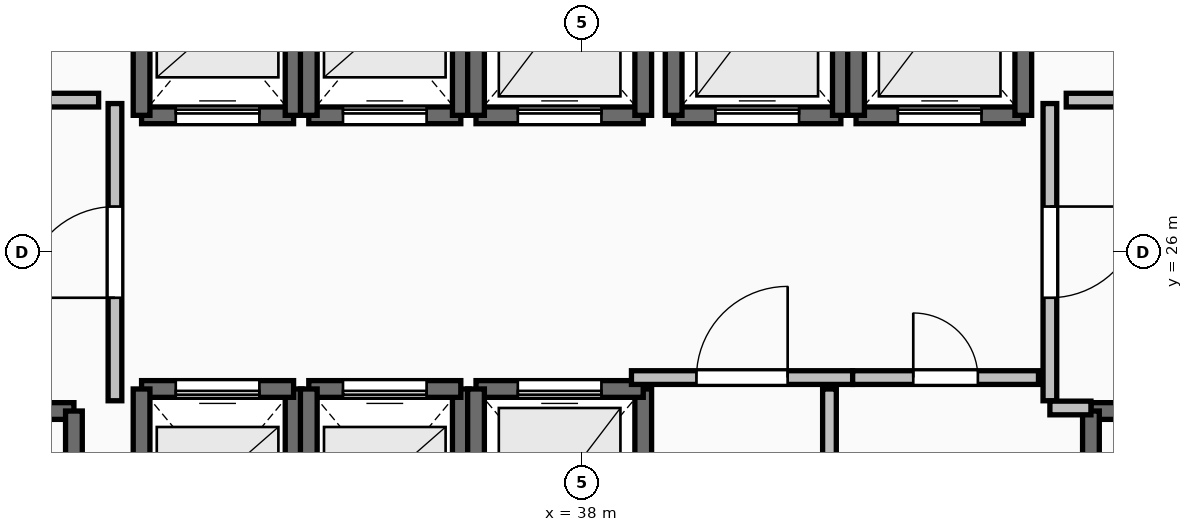
"""IFC4 building model, lengths in metres.
Left out: names, types, materials, properties, quantities, classifications, styles, units other than length and angle.
Written with IfcOpenShell. Run it as: python <this file> out.ifc"""

import sys

from ifc_helpers import new_model, si_unit, direction, frame, frame_2d, origin, place, context, subcontext, project, spatial, rectangle, extrude, element, fill, save


model = new_model("IFC4")
c1 = context("Model", 3, precision=1e-05, world=origin(), true_north=direction((0.0, 1.0)))
c2 = subcontext(c1, "Body", "Model", "MODEL_VIEW")
j1 = project(units=[si_unit("LENGTHUNIT", "METRE"), si_unit("PLANEANGLEUNIT", "RADIAN")], contexts=[c1])
p1 = place(None, origin())
s1 = spatial("IfcSite", under=j1, at=p1, CompositionType="ELEMENT")
p2 = place(p1, origin())
s2 = spatial("IfcBuilding", under=s1, at=p2, CompositionType="ELEMENT")
p3 = place(p2, origin())
s3 = spatial("IfcBuildingStorey", under=s2, at=p3, CompositionType="ELEMENT", Elevation=0.0)
p4 = place(p3, frame((27.94, 23.91, 0.0), z_axis=(0.0, 0.0, 1.0), x_axis=(1.0, 0.0, 0.0)))
e1 = element("IfcWall", 1, at=p4, inside=s3, PredefinedType="SOLIDWALL", context=c2, shape_type="SweptSolid", body=[
    extrude(rectangle(XDim=3.37, YDim=0.22, at=frame_2d((1.685, 0.0))), origin(), (0.0, 0.0, 1.0), 4.48),
])
p5 = place(p4, frame((1.135, 0.0, 0.0)))
e2 = element("IfcOpeningElement", 2, at=p5, cuts=e1, PredefinedType="OPENING", context=c2, shape_type="SweptSolid", body=[
    extrude(rectangle(XDim=1.1, YDim=2.15, at=frame_2d((0.55, 1.075))), frame((0.0, 0.125, 0.0), z_axis=(0.0, -1.0, 0.0), x_axis=(1.0, 0.0, 0.0)), (0.0, 0.0, 1.0), 0.25),
])
p6 = place(p3, frame((31.31, 23.91, 0.0), z_axis=(0.0, 0.0, 1.0), x_axis=(0.0, -1.0, 0.0)))
e3 = element("IfcWall", 3, at=p6, inside=s3, PredefinedType="SOLIDWALL", context=c2, shape_type="SweptSolid", body=[
    extrude(rectangle(XDim=7.42, YDim=0.22, at=frame_2d((3.71, 0.0))), origin(), (0.0, 0.0, 1.0), 4.48),
])
p7 = place(p3, frame((44.69, 23.91, 0.0), z_axis=(0.0, 0.0, 1.0), x_axis=(1.0, 0.0, 0.0)))
e4 = element("IfcWall", 4, at=p7, inside=s3, PredefinedType="SOLIDWALL", context=c2, shape_type="SweptSolid", body=[
    extrude(rectangle(XDim=3.37, YDim=0.22, at=frame_2d((1.685, 0.0))), origin(), (0.0, 0.0, 1.0), 4.48),
])
p8 = place(p7, frame((1.135, 0.0, 0.0)))
e5 = element("IfcOpeningElement", 5, at=p8, cuts=e4, PredefinedType="OPENING", context=c2, shape_type="SweptSolid", body=[
    extrude(rectangle(XDim=1.1, YDim=2.15, at=frame_2d((0.55, 1.075))), frame((0.0, 0.125, 0.0), z_axis=(0.0, -1.0, 0.0), x_axis=(1.0, 0.0, 0.0)), (0.0, 0.0, 1.0), 0.25),
])
p9 = place(p3, frame((44.69, 16.49, 0.0), z_axis=(0.0, 0.0, 1.0), x_axis=(0.0, 1.0, 0.0)))
e6 = element("IfcWall", 6, at=p9, inside=s3, PredefinedType="SOLIDWALL", context=c2, shape_type="SweptSolid", body=[
    extrude(rectangle(XDim=7.42, YDim=0.22, at=frame_2d((3.71, 0.0))), origin(), (0.0, 0.0, 1.0), 4.48),
])
p10 = place(p3, frame((32.2, 27.8, 0.0), z_axis=(0.0, 0.0, 1.0), x_axis=(1.0, 0.0, 0.0)))
e7 = element("IfcWall", 7, at=p10, inside=s3, PredefinedType="SOLIDWALL", context=c2, shape_type="SweptSolid", body=[
    extrude(rectangle(XDim=2.0, YDim=0.22, at=frame_2d((1.0, 0.0))), origin(), (0.0, 0.0, 1.0), 4.48),
])
p11 = place(p10, frame((0.45, 0.0, 0.0)))
e8 = element("IfcOpeningElement", 8, at=p11, cuts=e7, PredefinedType="OPENING", context=c2, shape_type="SweptSolid", body=[
    extrude(rectangle(XDim=1.1, YDim=2.2, at=frame_2d((0.55, 1.1))), frame((0.0, 0.125, 0.0), z_axis=(0.0, -1.0, 0.0), x_axis=(1.0, 0.0, 0.0)), (0.0, 0.0, 1.0), 0.25),
])
for number, where, z_axis, x_axis in (
    (9, (34.2, 27.8, 0.0), (0.0, 0.0, 1.0), (0.0, 1.0, 0.0)),
    (10, (32.2, 30.2, 0.0), (0.0, 0.0, 1.0), (0.0, -1.0, 0.0)),
):
    element("IfcWall", number, at=place(p3, frame(where, z_axis=z_axis, x_axis=x_axis)), inside=s3, PredefinedType="SOLIDWALL", context=c2, shape_type="SweptSolid", body=[
        extrude(rectangle(XDim=2.4, YDim=0.22, at=frame_2d((1.2, 0.0))), origin(), (0.0, 0.0, 1.0), 4.48),
    ])
p12 = place(p3, frame((34.4, 27.8, 0.0), z_axis=(0.0, 0.0, 1.0), x_axis=(1.0, 0.0, 0.0)))
e11 = element("IfcWall", 11, at=p12, inside=s3, PredefinedType="SOLIDWALL", context=c2, shape_type="SweptSolid", body=[
    extrude(rectangle(XDim=2.0, YDim=0.22, at=frame_2d((1.0, 0.0))), origin(), (0.0, 0.0, 1.0), 4.48),
])
p13 = place(p12, frame((0.45, 0.0, 0.0)))
e12 = element("IfcOpeningElement", 12, at=p13, cuts=e11, PredefinedType="OPENING", context=c2, shape_type="SweptSolid", body=[
    extrude(rectangle(XDim=1.1, YDim=2.2, at=frame_2d((0.55, 1.1))), frame((0.0, 0.125, 0.0), z_axis=(0.0, -1.0, 0.0), x_axis=(1.0, 0.0, 0.0)), (0.0, 0.0, 1.0), 0.25),
])
for number, where, z_axis, x_axis in (
    (13, (36.4, 27.8, 0.0), (0.0, 0.0, 1.0), (0.0, 1.0, 0.0)),
    (14, (34.4, 30.2, 0.0), (0.0, 0.0, 1.0), (0.0, -1.0, 0.0)),
):
    element("IfcWall", number, at=place(p3, frame(where, z_axis=z_axis, x_axis=x_axis)), inside=s3, PredefinedType="SOLIDWALL", context=c2, shape_type="SweptSolid", body=[
        extrude(rectangle(XDim=2.4, YDim=0.22, at=frame_2d((1.2, 0.0))), origin(), (0.0, 0.0, 1.0), 4.48),
    ])
p14 = place(p3, frame((36.6, 27.8, 0.0), z_axis=(0.0, 0.0, 1.0), x_axis=(1.0, 0.0, 0.0)))
e15 = element("IfcWall", 15, at=p14, inside=s3, PredefinedType="SOLIDWALL", context=c2, shape_type="SweptSolid", body=[
    extrude(rectangle(XDim=2.2, YDim=0.22, at=frame_2d((1.1, 0.0))), origin(), (0.0, 0.0, 1.0), 4.48),
])
p15 = place(p14, frame((0.55, 0.0, 0.0)))
e16 = element("IfcOpeningElement", 16, at=p15, cuts=e15, PredefinedType="OPENING", context=c2, shape_type="SweptSolid", body=[
    extrude(rectangle(XDim=1.1, YDim=2.2, at=frame_2d((0.55, 1.1))), frame((0.0, 0.125, 0.0), z_axis=(0.0, -1.0, 0.0), x_axis=(1.0, 0.0, 0.0)), (0.0, 0.0, 1.0), 0.25),
])
for number, where, z_axis, x_axis in (
    (17, (38.8, 27.8, 0.0), (0.0, 0.0, 1.0), (0.0, 1.0, 0.0)),
    (18, (36.6, 30.4, 0.0), (0.0, 0.0, 1.0), (0.0, -1.0, 0.0)),
):
    element("IfcWall", number, at=place(p3, frame(where, z_axis=z_axis, x_axis=x_axis)), inside=s3, PredefinedType="SOLIDWALL", context=c2, shape_type="SweptSolid", body=[
        extrude(rectangle(XDim=2.6, YDim=0.22, at=frame_2d((1.3, 0.0))), origin(), (0.0, 0.0, 1.0), 4.48),
    ])
p16 = place(p3, frame((34.2, 21.8, 0.0), z_axis=(0.0, 0.0, 1.0), x_axis=(0.0, 1.0, 0.0)))
e19 = element("IfcWall", 19, at=p16, inside=s3, PredefinedType="SOLIDWALL", context=c2, shape_type="SweptSolid", body=[
    extrude(rectangle(XDim=2.4, YDim=0.22, at=frame_2d((1.2, 0.0))), origin(), (0.0, 0.0, 1.0), 4.48),
])
p17 = place(p3, frame((34.2, 24.2, 0.0), z_axis=(0.0, 0.0, 1.0), x_axis=(-1.0, 0.0, 0.0)))
e20 = element("IfcWall", 20, at=p17, inside=s3, PredefinedType="SOLIDWALL", context=c2, shape_type="SweptSolid", body=[
    extrude(rectangle(XDim=2.0, YDim=0.22, at=frame_2d((1.0, 0.0))), origin(), (0.0, 0.0, 1.0), 4.48),
])
p18 = place(p17, frame((0.45, 0.0, 0.0)))
e21 = element("IfcOpeningElement", 21, at=p18, cuts=e20, PredefinedType="OPENING", context=c2, shape_type="SweptSolid", body=[
    extrude(rectangle(XDim=1.1, YDim=2.2, at=frame_2d((0.55, 1.1))), frame((0.0, 0.125, 0.0), z_axis=(0.0, -1.0, 0.0), x_axis=(1.0, 0.0, 0.0)), (0.0, 0.0, 1.0), 0.25),
])
for number, where, z_axis, x_axis in (
    (22, (32.2, 24.2, 0.0), (0.0, 0.0, 1.0), (0.0, -1.0, 0.0)),
    (23, (36.4, 21.8, 0.0), (0.0, 0.0, 1.0), (0.0, 1.0, 0.0)),
):
    element("IfcWall", number, at=place(p3, frame(where, z_axis=z_axis, x_axis=x_axis)), inside=s3, PredefinedType="SOLIDWALL", context=c2, shape_type="SweptSolid", body=[
        extrude(rectangle(XDim=2.4, YDim=0.22, at=frame_2d((1.2, 0.0))), origin(), (0.0, 0.0, 1.0), 4.48),
    ])
p19 = place(p3, frame((36.4, 24.2, 0.0), z_axis=(0.0, 0.0, 1.0), x_axis=(-1.0, 0.0, 0.0)))
e24 = element("IfcWall", 24, at=p19, inside=s3, PredefinedType="SOLIDWALL", context=c2, shape_type="SweptSolid", body=[
    extrude(rectangle(XDim=2.0, YDim=0.22, at=frame_2d((1.0, 0.0))), origin(), (0.0, 0.0, 1.0), 4.48),
])
p20 = place(p19, frame((0.45, 0.0, 0.0)))
e25 = element("IfcOpeningElement", 25, at=p20, cuts=e24, PredefinedType="OPENING", context=c2, shape_type="SweptSolid", body=[
    extrude(rectangle(XDim=1.1, YDim=2.2, at=frame_2d((0.55, 1.1))), frame((0.0, 0.125, 0.0), z_axis=(0.0, -1.0, 0.0), x_axis=(1.0, 0.0, 0.0)), (0.0, 0.0, 1.0), 0.25),
])
p21 = place(p3, frame((34.4, 24.2, 0.0), z_axis=(0.0, 0.0, 1.0), x_axis=(0.0, -1.0, 0.0)))
e26 = element("IfcWall", 26, at=p21, inside=s3, PredefinedType="SOLIDWALL", context=c2, shape_type="SweptSolid", body=[
    extrude(rectangle(XDim=2.4, YDim=0.22, at=frame_2d((1.2, 0.0))), origin(), (0.0, 0.0, 1.0), 4.48),
])
p22 = place(p3, frame((38.8, 21.6, 0.0), z_axis=(0.0, 0.0, 1.0), x_axis=(0.0, 1.0, 0.0)))
e27 = element("IfcWall", 27, at=p22, inside=s3, PredefinedType="SOLIDWALL", context=c2, shape_type="SweptSolid", body=[
    extrude(rectangle(XDim=2.6, YDim=0.22, at=frame_2d((1.3, 0.0))), origin(), (0.0, 0.0, 1.0), 4.48),
])
p23 = place(p3, frame((38.8, 24.2, 0.0), z_axis=(0.0, 0.0, 1.0), x_axis=(-1.0, 0.0, 0.0)))
e28 = element("IfcWall", 28, at=p23, inside=s3, PredefinedType="SOLIDWALL", context=c2, shape_type="SweptSolid", body=[
    extrude(rectangle(XDim=2.2, YDim=0.22, at=frame_2d((1.1, 0.0))), origin(), (0.0, 0.0, 1.0), 4.48),
])
p24 = place(p23, frame((0.55, 0.0, 0.0)))
e29 = element("IfcOpeningElement", 29, at=p24, cuts=e28, PredefinedType="OPENING", context=c2, shape_type="SweptSolid", body=[
    extrude(rectangle(XDim=1.1, YDim=2.2, at=frame_2d((0.55, 1.1))), frame((0.0, 0.125, 0.0), z_axis=(0.0, -1.0, 0.0), x_axis=(1.0, 0.0, 0.0)), (0.0, 0.0, 1.0), 0.25),
])
p25 = place(p3, frame((36.6, 24.2, 0.0), z_axis=(0.0, 0.0, 1.0), x_axis=(0.0, -1.0, 0.0)))
e30 = element("IfcWall", 30, at=p25, inside=s3, PredefinedType="SOLIDWALL", context=c2, shape_type="SweptSolid", body=[
    extrude(rectangle(XDim=2.6, YDim=0.22, at=frame_2d((1.3, 0.0))), origin(), (0.0, 0.0, 1.0), 4.48),
])
p26 = place(p3, frame((39.2, 27.8, 0.0), z_axis=(0.0, 0.0, 1.0), x_axis=(1.0, 0.0, 0.0)))
e31 = element("IfcWall", 31, at=p26, inside=s3, PredefinedType="SOLIDWALL", context=c2, shape_type="SweptSolid", body=[
    extrude(rectangle(XDim=2.2, YDim=0.22, at=frame_2d((1.1, 0.0))), origin(), (0.0, 0.0, 1.0), 4.48),
])
p27 = place(p26, frame((0.55, 0.0, 0.0)))
e32 = element("IfcOpeningElement", 32, at=p27, cuts=e31, PredefinedType="OPENING", context=c2, shape_type="SweptSolid", body=[
    extrude(rectangle(XDim=1.1, YDim=2.2, at=frame_2d((0.55, 1.1))), frame((0.0, 0.125, 0.0), z_axis=(0.0, -1.0, 0.0), x_axis=(1.0, 0.0, 0.0)), (0.0, 0.0, 1.0), 0.25),
])
for number, where, z_axis, x_axis in (
    (33, (41.4, 27.8, 0.0), (0.0, 0.0, 1.0), (0.0, 1.0, 0.0)),
    (34, (39.2, 30.4, 0.0), (0.0, 0.0, 1.0), (0.0, -1.0, 0.0)),
):
    element("IfcWall", number, at=place(p3, frame(where, z_axis=z_axis, x_axis=x_axis)), inside=s3, PredefinedType="SOLIDWALL", context=c2, shape_type="SweptSolid", body=[
        extrude(rectangle(XDim=2.6, YDim=0.22, at=frame_2d((1.3, 0.0))), origin(), (0.0, 0.0, 1.0), 4.48),
    ])
p28 = place(p3, frame((41.6, 27.8, 0.0), z_axis=(0.0, 0.0, 1.0), x_axis=(1.0, 0.0, 0.0)))
e35 = element("IfcWall", 35, at=p28, inside=s3, PredefinedType="SOLIDWALL", context=c2, shape_type="SweptSolid", body=[
    extrude(rectangle(XDim=2.2, YDim=0.22, at=frame_2d((1.1, 0.0))), origin(), (0.0, 0.0, 1.0), 4.48),
])
p29 = place(p28, frame((0.55, 0.0, 0.0)))
e36 = element("IfcOpeningElement", 36, at=p29, cuts=e35, PredefinedType="OPENING", context=c2, shape_type="SweptSolid", body=[
    extrude(rectangle(XDim=1.1, YDim=2.2, at=frame_2d((0.55, 1.1))), frame((0.0, 0.125, 0.0), z_axis=(0.0, -1.0, 0.0), x_axis=(1.0, 0.0, 0.0)), (0.0, 0.0, 1.0), 0.25),
])
for number, where, z_axis, x_axis in (
    (37, (43.8, 27.8, 0.0), (0.0, 0.0, 1.0), (0.0, 1.0, 0.0)),
    (38, (41.6, 30.4, 0.0), (0.0, 0.0, 1.0), (0.0, -1.0, 0.0)),
):
    element("IfcWall", number, at=place(p3, frame(where, z_axis=z_axis, x_axis=x_axis)), inside=s3, PredefinedType="SOLIDWALL", context=c2, shape_type="SweptSolid", body=[
        extrude(rectangle(XDim=2.6, YDim=0.22, at=frame_2d((1.3, 0.0))), origin(), (0.0, 0.0, 1.0), 4.48),
    ])
p30 = place(p3, frame((31.85, 24.045, 0.0), z_axis=(0.0, 0.0, 1.0), x_axis=(0.0, 1.0, 0.0)))
e39 = element("IfcWall", 39, at=p30, inside=s3, PredefinedType="PARTITIONING", context=c2, shape_type="SweptSolid", body=[
    extrude(rectangle(XDim=3.91, YDim=0.18, at=frame_2d((1.955, 0.0))), origin(), (0.0, 0.0, 1.0), 4.48),
])
p31 = place(p30, frame((1.355, 0.0, 0.0)))
e40 = element("IfcOpeningElement", 40, at=p31, cuts=e39, PredefinedType="OPENING", context=c2, shape_type="SweptSolid", body=[
    extrude(rectangle(XDim=1.2, YDim=2.15, at=frame_2d((0.6, 1.075))), frame((0.0, 0.105, 0.0), z_axis=(0.0, -1.0, 0.0), x_axis=(1.0, 0.0, 0.0)), (0.0, 0.0, 1.0), 0.21),
])
p32 = place(p3, frame((44.15, 27.955, 0.0), z_axis=(0.0, 0.0, 1.0), x_axis=(0.0, -1.0, 0.0)))
e41 = element("IfcWall", 41, at=p32, inside=s3, PredefinedType="PARTITIONING", context=c2, shape_type="SweptSolid", body=[
    extrude(rectangle(XDim=3.91, YDim=0.18, at=frame_2d((1.955, 0.0))), origin(), (0.0, 0.0, 1.0), 4.48),
])
p33 = place(p32, frame((1.355, 0.0, 0.0)))
e42 = element("IfcOpeningElement", 42, at=p33, cuts=e41, PredefinedType="OPENING", context=c2, shape_type="SweptSolid", body=[
    extrude(rectangle(XDim=1.2, YDim=2.15, at=frame_2d((0.6, 1.075))), frame((0.0, 0.105, 0.0), z_axis=(0.0, -1.0, 0.0), x_axis=(1.0, 0.0, 0.0)), (0.0, 0.0, 1.0), 0.21),
])
p34 = place(p3, frame((44.15, 23.95, 0.0), z_axis=(0.0, 0.0, 1.0), x_axis=(1.0, 0.0, 0.0)))
e43 = element("IfcWall", 43, at=p34, inside=s3, PredefinedType="PARTITIONING", context=c2, shape_type="SweptSolid", body=[
    extrude(rectangle(XDim=0.54, YDim=0.18, at=frame_2d((0.27, 0.0))), origin(), (0.0, 0.0, 1.0), 4.48),
])
p35 = place(p3, frame((38.645, 24.35, 0.0), z_axis=(0.0, 0.0, 1.0), x_axis=(1.0, 0.0, 0.0)))
e44 = element("IfcWall", 44, at=p35, inside=s3, PredefinedType="PARTITIONING", context=c2, shape_type="SweptSolid", body=[
    extrude(rectangle(XDim=2.91, YDim=0.18, at=frame_2d((1.455, 0.0))), origin(), (0.0, 0.0, 1.0), 4.48),
])
p36 = place(p35, frame((0.855, 0.0, 0.0)))
e45 = element("IfcOpeningElement", 45, at=p36, cuts=e44, PredefinedType="OPENING", context=c2, shape_type="SweptSolid", body=[
    extrude(rectangle(XDim=1.2, YDim=2.15, at=frame_2d((0.6, 1.075))), frame((0.0, 0.105, 0.0), z_axis=(0.0, -1.0, 0.0), x_axis=(1.0, 0.0, 0.0)), (0.0, 0.0, 1.0), 0.21),
])
p37 = place(p3, frame((41.555, 24.35, 0.0), z_axis=(0.0, 0.0, 1.0), x_axis=(1.0, 0.0, 0.0)))
e46 = element("IfcWall", 46, at=p37, inside=s3, PredefinedType="PARTITIONING", context=c2, shape_type="SweptSolid", body=[
    extrude(rectangle(XDim=2.445, YDim=0.18, at=frame_2d((1.223, 0.0))), origin(), (0.0, 0.0, 1.0), 4.48),
])
p38 = place(p37, frame((0.798, 0.0, 0.0)))
e47 = element("IfcOpeningElement", 47, at=p38, cuts=e46, PredefinedType="OPENING", context=c2, shape_type="SweptSolid", body=[
    extrude(rectangle(XDim=0.85, YDim=2.1, at=frame_2d((0.425, 1.05))), frame((0.0, 0.105, 0.0), z_axis=(0.0, -1.0, 0.0), x_axis=(1.0, 0.0, 0.0)), (0.0, 0.0, 1.0), 0.21),
])
p39 = place(p3, frame((41.25, 20.305, 0.0), z_axis=(0.0, 0.0, 1.0), x_axis=(0.0, 1.0, 0.0)))
e48 = element("IfcWall", 48, at=p39, inside=s3, PredefinedType="PARTITIONING", context=c2, shape_type="SweptSolid", body=[
    extrude(rectangle(XDim=3.895, YDim=0.18, at=frame_2d((1.948, 0.0))), origin(), (0.0, 0.0, 1.0), 4.48),
])
p40 = place(p39, frame((1.522, 0.0, 0.0)))
e49 = element("IfcOpeningElement", 49, at=p40, cuts=e48, PredefinedType="OPENING", context=c2, shape_type="SweptSolid", body=[
    extrude(rectangle(XDim=0.85, YDim=2.1, at=frame_2d((0.425, 1.05))), frame((0.0, 0.105, 0.0), z_axis=(0.0, -1.0, 0.0), x_axis=(1.0, 0.0, 0.0)), (0.0, 0.0, 1.0), 0.21),
])
for number, where, z_axis, x_axis in (
    (50, (31.635, 28.0, 0.0), (0.0, 0.0, 1.0), (-1.0, 0.0, 0.0)),
    (51, (45.28, 28.0, 0.0), (0.0, 0.0, 1.0), (-1.0, 0.0, 0.0)),
):
    element("IfcWall", number, at=place(p3, frame(where, z_axis=z_axis, x_axis=x_axis)), inside=s3, PredefinedType="PARTITIONING", context=c2, shape_type="SweptSolid", body=[
        extrude(rectangle(XDim=0.915, YDim=0.18, at=frame_2d((0.458, 0.0))), origin(), (0.0, 0.0, 1.0), 4.48),
    ])
p41 = place(p11, origin())
e52 = element("IfcDoor", 52, at=p41, inside=s3, OperationType="SLIDING_TO_LEFT", PredefinedType="DOOR", context=c2, shape_type="SweptSolid", body=[
    extrude(rectangle(XDim=1.1, YDim=2.2, at=frame_2d((0.55, 1.1))), frame((0.0, 0.025, 0.0), z_axis=(0.0, -1.0, 0.0), x_axis=(1.0, 0.0, 0.0)), (0.0, 0.0, 1.0), 0.05),
])
fill(e8, e52)
p42 = place(p13, origin())
e53 = element("IfcDoor", 53, at=p42, inside=s3, OperationType="SLIDING_TO_LEFT", PredefinedType="DOOR", context=c2, shape_type="SweptSolid", body=[
    extrude(rectangle(XDim=1.1, YDim=2.2, at=frame_2d((0.55, 1.1))), frame((0.0, 0.025, 0.0), z_axis=(0.0, -1.0, 0.0), x_axis=(1.0, 0.0, 0.0)), (0.0, 0.0, 1.0), 0.05),
])
fill(e12, e53)
p43 = place(p15, origin())
e54 = element("IfcDoor", 54, at=p43, inside=s3, OperationType="SLIDING_TO_LEFT", PredefinedType="DOOR", context=c2, shape_type="SweptSolid", body=[
    extrude(rectangle(XDim=1.1, YDim=2.2, at=frame_2d((0.55, 1.1))), frame((0.0, 0.025, 0.0), z_axis=(0.0, -1.0, 0.0), x_axis=(1.0, 0.0, 0.0)), (0.0, 0.0, 1.0), 0.05),
])
fill(e16, e54)
p44 = place(p18, origin())
e55 = element("IfcDoor", 55, at=p44, inside=s3, OperationType="SLIDING_TO_LEFT", PredefinedType="DOOR", context=c2, shape_type="SweptSolid", body=[
    extrude(rectangle(XDim=1.1, YDim=2.2, at=frame_2d((0.55, 1.1))), frame((0.0, 0.025, 0.0), z_axis=(0.0, -1.0, 0.0), x_axis=(1.0, 0.0, 0.0)), (0.0, 0.0, 1.0), 0.05),
])
fill(e21, e55)
p45 = place(p20, origin())
e56 = element("IfcDoor", 56, at=p45, inside=s3, OperationType="SLIDING_TO_LEFT", PredefinedType="DOOR", context=c2, shape_type="SweptSolid", body=[
    extrude(rectangle(XDim=1.1, YDim=2.2, at=frame_2d((0.55, 1.1))), frame((0.0, 0.025, 0.0), z_axis=(0.0, -1.0, 0.0), x_axis=(1.0, 0.0, 0.0)), (0.0, 0.0, 1.0), 0.05),
])
fill(e25, e56)
p46 = place(p24, origin())
e57 = element("IfcDoor", 57, at=p46, inside=s3, OperationType="SLIDING_TO_LEFT", PredefinedType="DOOR", context=c2, shape_type="SweptSolid", body=[
    extrude(rectangle(XDim=1.1, YDim=2.2, at=frame_2d((0.55, 1.1))), frame((0.0, 0.025, 0.0), z_axis=(0.0, -1.0, 0.0), x_axis=(1.0, 0.0, 0.0)), (0.0, 0.0, 1.0), 0.05),
])
fill(e29, e57)
p47 = place(p27, origin())
e58 = element("IfcDoor", 58, at=p47, inside=s3, OperationType="SLIDING_TO_LEFT", PredefinedType="DOOR", context=c2, shape_type="SweptSolid", body=[
    extrude(rectangle(XDim=1.1, YDim=2.2, at=frame_2d((0.55, 1.1))), frame((0.0, 0.025, 0.0), z_axis=(0.0, -1.0, 0.0), x_axis=(1.0, 0.0, 0.0)), (0.0, 0.0, 1.0), 0.05),
])
fill(e32, e58)
p48 = place(p29, origin())
e59 = element("IfcDoor", 59, at=p48, inside=s3, OperationType="SLIDING_TO_LEFT", PredefinedType="DOOR", context=c2, shape_type="SweptSolid", body=[
    extrude(rectangle(XDim=1.1, YDim=2.2, at=frame_2d((0.55, 1.1))), frame((0.0, 0.025, 0.0), z_axis=(0.0, -1.0, 0.0), x_axis=(1.0, 0.0, 0.0)), (0.0, 0.0, 1.0), 0.05),
])
fill(e36, e59)
p49 = place(p31, origin())
e60 = element("IfcDoor", 60, at=p49, inside=s3, OperationType="SINGLE_SWING_LEFT", PredefinedType="DOOR", context=c2, shape_type="SweptSolid", body=[
    extrude(rectangle(XDim=1.2, YDim=2.15, at=frame_2d((0.6, 1.075))), frame((0.0, 0.025, 0.0), z_axis=(0.0, -1.0, 0.0), x_axis=(1.0, 0.0, 0.0)), (0.0, 0.0, 1.0), 0.05),
])
fill(e40, e60)
p50 = place(p33, origin())
e61 = element("IfcDoor", 61, at=p50, inside=s3, OperationType="SINGLE_SWING_LEFT", PredefinedType="DOOR", context=c2, shape_type="SweptSolid", body=[
    extrude(rectangle(XDim=1.2, YDim=2.15, at=frame_2d((0.6, 1.075))), frame((0.0, 0.025, 0.0), z_axis=(0.0, -1.0, 0.0), x_axis=(1.0, 0.0, 0.0)), (0.0, 0.0, 1.0), 0.05),
])
fill(e42, e61)
p51 = place(p36, origin())
e62 = element("IfcDoor", 62, at=p51, inside=s3, OperationType="SINGLE_SWING_RIGHT", PredefinedType="DOOR", context=c2, shape_type="SweptSolid", body=[
    extrude(rectangle(XDim=1.2, YDim=2.15, at=frame_2d((0.6, 1.075))), frame((0.0, 0.025, 0.0), z_axis=(0.0, -1.0, 0.0), x_axis=(1.0, 0.0, 0.0)), (0.0, 0.0, 1.0), 0.05),
])
fill(e45, e62)
p52 = place(p38, origin())
e63 = element("IfcDoor", 63, at=p52, inside=s3, OperationType="SINGLE_SWING_LEFT", PredefinedType="DOOR", context=c2, shape_type="SweptSolid", body=[
    extrude(rectangle(XDim=0.85, YDim=2.1, at=frame_2d((0.425, 1.05))), frame((0.0, 0.025, 0.0), z_axis=(0.0, -1.0, 0.0), x_axis=(1.0, 0.0, 0.0)), (0.0, 0.0, 1.0), 0.05),
])
fill(e47, e63)
save(model, sys.argv[1])
